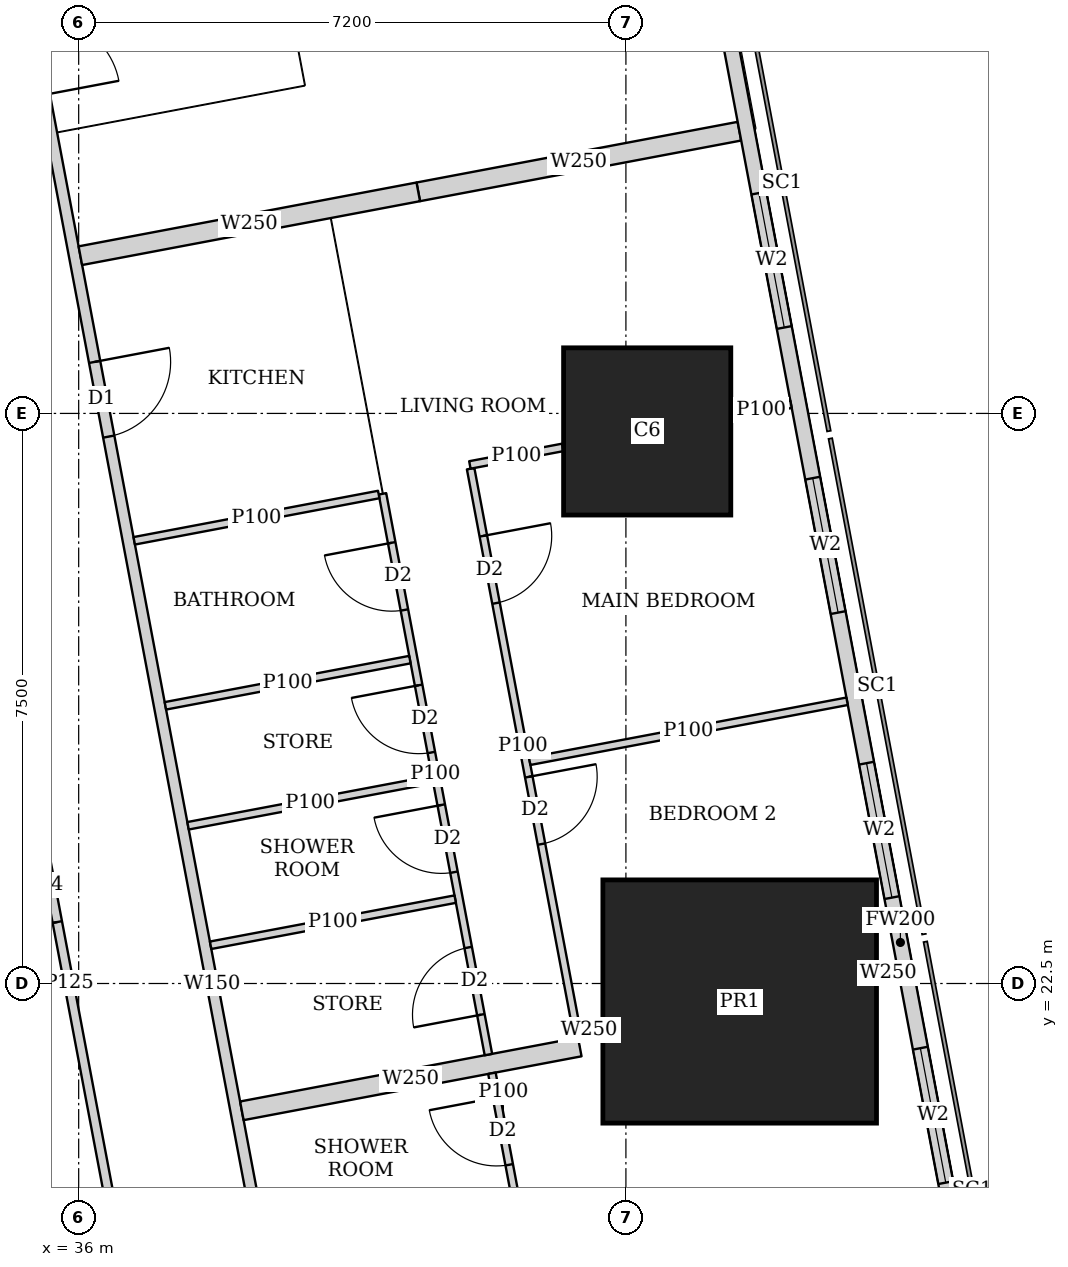
"""IFC4 building model, lengths in metres.
Left out: names, types, materials, properties, quantities, classifications, styles, units other than length and angle.
Written with IfcOpenShell. Run it as: python <this file> out.ifc"""

import sys

from ifc_helpers import new_model, si_unit, direction, frame, frame_2d, origin, origin_2d, place, context, subcontext, project, spatial, rectangle, extrude, element, fill, save


model = new_model("IFC4")
c1 = context("Model", 3, precision=1e-05, world=origin(), true_north=direction((0.0, 1.0)))
c2 = subcontext(c1, "Body", "Model", "MODEL_VIEW")
j1 = project(units=[si_unit("LENGTHUNIT", "METRE"), si_unit("PLANEANGLEUNIT", "RADIAN")], contexts=[c1])
p1 = place(None, origin())
s1 = spatial("IfcSite", under=j1, at=p1, CompositionType="ELEMENT")
p2 = place(p1, origin())
s2 = spatial("IfcBuilding", under=s1, at=p2, CompositionType="ELEMENT")
p3 = place(p2, frame((0.0, 0.0, 100.4)))
s3 = spatial("IfcBuildingStorey", under=s2, at=p3, CompositionType="ELEMENT", Elevation=100.4)
p4 = place(p3, frame((44.697, 22.263, 0.0), z_axis=(0.0, 0.0, 1.0), x_axis=(1.0, 0.0, 0.0)))
e1 = element("IfcColumn", 1, at=p4, inside=s3, PredefinedType="COLUMN", context=c2, shape_type="SweptSolid", body=[
    extrude(rectangle(XDim=3.6, YDim=3.2, at=origin_2d()), origin(), (0.0, 0.0, 1.0), 3.75),
])
p5 = place(p3, frame((43.48, 29.763, 0.0), z_axis=(0.0, 0.0, 1.0), x_axis=(1.0, 0.0, 0.0)))
e2 = element("IfcColumn", 2, at=p5, inside=s3, PredefinedType="COLUMN", context=c2, shape_type="SweptSolid", body=[
    extrude(rectangle(XDim=2.2, YDim=2.2, at=origin_2d()), origin(), (0.0, 0.0, 1.0), 3.75),
])
p6 = place(p3, frame((50.653, 2.703, 0.0), z_axis=(0.0, 0.0, 1.0), x_axis=(-0.185612026696, 0.982623109613, 0.0)))
e3 = element("IfcWall", 3, at=p6, inside=s3, PredefinedType="SOLIDWALL", context=c2, shape_type="SweptSolid", body=[
    extrude(rectangle(XDim=41.393, YDim=0.2, at=frame_2d((20.697, 0.0))), origin(), (0.0, 0.0, 1.0), 3.5),
])
p7 = place(p6, frame((1.633, 0.0, 0.9)))
e4 = element("IfcOpeningElement", 4, at=p7, cuts=e3, PredefinedType="OPENING", context=c2, shape_type="SweptSolid", body=[
    extrude(rectangle(XDim=1.8, YDim=1.5, at=frame_2d((0.9, 0.75))), frame((0.0, 0.11, 0.0), z_axis=(0.0, -1.0, 0.0), x_axis=(1.0, 0.0, 0.0)), (0.0, 0.0, 1.0), 0.22),
])
p8 = place(p6, frame((6.032, 0.0, 0.9)))
e5 = element("IfcOpeningElement", 5, at=p8, cuts=e3, PredefinedType="OPENING", context=c2, shape_type="SweptSolid", body=[
    extrude(rectangle(XDim=1.8, YDim=1.5, at=frame_2d((0.9, 0.75))), frame((0.0, 0.11, 0.0), z_axis=(0.0, -1.0, 0.0), x_axis=(1.0, 0.0, 0.0)), (0.0, 0.0, 1.0), 0.22),
])
p9 = place(p6, frame((9.848, 0.0, 0.9)))
e6 = element("IfcOpeningElement", 6, at=p9, cuts=e3, PredefinedType="OPENING", context=c2, shape_type="SweptSolid", body=[
    extrude(rectangle(XDim=1.8, YDim=1.5, at=frame_2d((0.9, 0.75))), frame((0.0, 0.11, 0.0), z_axis=(0.0, -1.0, 0.0), x_axis=(1.0, 0.0, 0.0)), (0.0, 0.0, 1.0), 0.22),
])
p10 = place(p6, frame((13.664, 0.0, 0.9)))
e7 = element("IfcOpeningElement", 7, at=p10, cuts=e3, PredefinedType="OPENING", context=c2, shape_type="SweptSolid", body=[
    extrude(rectangle(XDim=1.8, YDim=1.5, at=frame_2d((0.9, 0.75))), frame((0.0, 0.11, 0.0), z_axis=(0.0, -1.0, 0.0), x_axis=(1.0, 0.0, 0.0)), (0.0, 0.0, 1.0), 0.22),
])
p11 = place(p6, frame((17.481, 0.0, 0.9)))
e8 = element("IfcOpeningElement", 8, at=p11, cuts=e3, PredefinedType="OPENING", context=c2, shape_type="SweptSolid", body=[
    extrude(rectangle(XDim=1.8, YDim=1.5, at=frame_2d((0.9, 0.75))), frame((0.0, 0.11, 0.0), z_axis=(0.0, -1.0, 0.0), x_axis=(1.0, 0.0, 0.0)), (0.0, 0.0, 1.0), 0.22),
])
p12 = place(p6, frame((21.297, 0.0, 0.9)))
e9 = element("IfcOpeningElement", 9, at=p12, cuts=e3, PredefinedType="OPENING", context=c2, shape_type="SweptSolid", body=[
    extrude(rectangle(XDim=1.8, YDim=1.5, at=frame_2d((0.9, 0.75))), frame((0.0, 0.11, 0.0), z_axis=(0.0, -1.0, 0.0), x_axis=(1.0, 0.0, 0.0)), (0.0, 0.0, 1.0), 0.22),
])
p13 = place(p6, frame((25.113, 0.0, 0.9)))
e10 = element("IfcOpeningElement", 10, at=p13, cuts=e3, PredefinedType="OPENING", context=c2, shape_type="SweptSolid", body=[
    extrude(rectangle(XDim=1.8, YDim=1.5, at=frame_2d((0.9, 0.75))), frame((0.0, 0.11, 0.0), z_axis=(0.0, -1.0, 0.0), x_axis=(1.0, 0.0, 0.0)), (0.0, 0.0, 1.0), 0.22),
])
p14 = place(p6, frame((28.93, 0.0, 0.9)))
e11 = element("IfcOpeningElement", 11, at=p14, cuts=e3, PredefinedType="OPENING", context=c2, shape_type="SweptSolid", body=[
    extrude(rectangle(XDim=1.8, YDim=1.5, at=frame_2d((0.9, 0.75))), frame((0.0, 0.11, 0.0), z_axis=(0.0, -1.0, 0.0), x_axis=(1.0, 0.0, 0.0)), (0.0, 0.0, 1.0), 0.22),
])
p15 = place(p6, frame((32.746, 0.0, 0.9)))
e12 = element("IfcOpeningElement", 12, at=p15, cuts=e3, PredefinedType="OPENING", context=c2, shape_type="SweptSolid", body=[
    extrude(rectangle(XDim=1.8, YDim=1.5, at=frame_2d((0.9, 0.75))), frame((0.0, 0.11, 0.0), z_axis=(0.0, -1.0, 0.0), x_axis=(1.0, 0.0, 0.0)), (0.0, 0.0, 1.0), 0.22),
])
p16 = place(p6, frame((36.481, 0.0, 0.9)))
e13 = element("IfcOpeningElement", 13, at=p16, cuts=e3, PredefinedType="OPENING", context=c2, shape_type="SweptSolid", body=[
    extrude(rectangle(XDim=1.8, YDim=1.5, at=frame_2d((0.9, 0.75))), frame((0.0, 0.11, 0.0), z_axis=(0.0, -1.0, 0.0), x_axis=(1.0, 0.0, 0.0)), (0.0, 0.0, 1.0), 0.22),
])
p17 = place(p3, frame((33.382, 45.65, 0.0), z_axis=(0.0, 0.0, 1.0), x_axis=(0.185593544777, -0.982626600565, 0.0)))
e14 = element("IfcWall", 14, at=p17, inside=s3, PredefinedType="SOLIDWALL", context=c2, shape_type="SweptSolid", body=[
    extrude(rectangle(XDim=47.118, YDim=0.15, at=frame_2d((23.559, 0.0))), origin(), (0.0, 0.0, 1.0), 2.2),
])
p18 = place(p17, frame((10.662, 0.0, 0.0)))
e15 = element("IfcOpeningElement", 15, at=p18, cuts=e14, PredefinedType="OPENING", context=c2, shape_type="SweptSolid", body=[
    extrude(rectangle(XDim=1.0, YDim=2.1, at=frame_2d((0.5, 1.05))), frame((0.0, 0.085, 0.0), z_axis=(0.0, -1.0, 0.0), x_axis=(1.0, 0.0, 0.0)), (0.0, 0.0, 1.0), 0.17),
])
p19 = place(p17, frame((15.237, 0.0, 0.0)))
e16 = element("IfcOpeningElement", 16, at=p19, cuts=e14, PredefinedType="OPENING", context=c2, shape_type="SweptSolid", body=[
    extrude(rectangle(XDim=1.0, YDim=2.1, at=frame_2d((0.5, 1.05))), frame((0.0, 0.085, 0.0), z_axis=(0.0, -1.0, 0.0), x_axis=(1.0, 0.0, 0.0)), (0.0, 0.0, 1.0), 0.17),
])
p20 = place(p17, frame((27.341, 0.0, 0.0)))
e17 = element("IfcOpeningElement", 17, at=p20, cuts=e14, PredefinedType="OPENING", context=c2, shape_type="SweptSolid", body=[
    extrude(rectangle(XDim=1.0, YDim=2.1, at=frame_2d((0.5, 1.05))), frame((0.0, 0.085, 0.0), z_axis=(0.0, -1.0, 0.0), x_axis=(1.0, 0.0, 0.0)), (0.0, 0.0, 1.0), 0.17),
])
p21 = place(p17, frame((33.833, 0.0, 0.0)))
e18 = element("IfcOpeningElement", 18, at=p21, cuts=e14, PredefinedType="OPENING", context=c2, shape_type="SweptSolid", body=[
    extrude(rectangle(XDim=1.0, YDim=2.1, at=frame_2d((0.5, 1.05))), frame((0.0, 0.085, 0.0), z_axis=(0.0, -1.0, 0.0), x_axis=(1.0, 0.0, 0.0)), (0.0, 0.0, 1.0), 0.17),
])
p22 = place(p3, frame((41.157, 29.273, 0.0), z_axis=(0.0, 0.0, 1.0), x_axis=(0.18542464283, -0.982658486877, 0.0)))
e19 = element("IfcWall", 19, at=p22, inside=s3, PredefinedType="PARTITIONING", context=c2, shape_type="SweptSolid", body=[
    extrude(rectangle(XDim=7.421, YDim=0.1, at=frame_2d((3.71, 0.0))), origin(), (0.0, 0.0, 1.0), 2.5),
])
p23 = place(p22, frame((0.9, 0.0, 0.0)))
e20 = element("IfcOpeningElement", 20, at=p23, cuts=e19, PredefinedType="OPENING", context=c2, shape_type="SweptSolid", body=[
    extrude(rectangle(XDim=0.9, YDim=2.1, at=frame_2d((0.45, 1.05))), frame((0.0, 0.06, 0.0), z_axis=(0.0, -1.0, 0.0), x_axis=(1.0, 0.0, 0.0)), (0.0, 0.0, 1.0), 0.12),
])
p24 = place(p22, frame((4.126, 0.0, 0.0)))
e21 = element("IfcOpeningElement", 21, at=p24, cuts=e19, PredefinedType="OPENING", context=c2, shape_type="SweptSolid", body=[
    extrude(rectangle(XDim=0.9, YDim=2.1, at=frame_2d((0.45, 1.05))), frame((0.0, 0.06, 0.0), z_axis=(0.0, -1.0, 0.0), x_axis=(1.0, 0.0, 0.0)), (0.0, 0.0, 1.0), 0.12),
])
p25 = place(p3, frame((39.997, 28.942, 0.0), z_axis=(0.0, 0.0, 1.0), x_axis=(0.185686318797, -0.982609073341, 0.0)))
e22 = element("IfcWall", 22, at=p25, inside=s3, PredefinedType="PARTITIONING", context=c2, shape_type="SweptSolid", body=[
    extrude(rectangle(XDim=7.508, YDim=0.1, at=frame_2d((3.754, 0.0))), origin(), (0.0, 0.0, 1.0), 2.5),
])
p26 = place(p25, frame((0.655, 0.0, 0.0)))
e23 = element("IfcOpeningElement", 23, at=p26, cuts=e22, PredefinedType="OPENING", context=c2, shape_type="SweptSolid", body=[
    extrude(rectangle(XDim=0.9, YDim=2.1, at=frame_2d((0.45, 1.05))), frame((0.0, 0.06, 0.0), z_axis=(0.0, -1.0, 0.0), x_axis=(1.0, 0.0, 0.0)), (0.0, 0.0, 1.0), 0.12),
])
p27 = place(p25, frame((4.166, 0.0, 0.0)))
e24 = element("IfcOpeningElement", 24, at=p27, cuts=e22, PredefinedType="OPENING", context=c2, shape_type="SweptSolid", body=[
    extrude(rectangle(XDim=0.9, YDim=2.1, at=frame_2d((0.45, 1.05))), frame((0.0, 0.06, 0.0), z_axis=(0.0, -1.0, 0.0), x_axis=(1.0, 0.0, 0.0)), (0.0, 0.0, 1.0), 0.12),
])
p28 = place(p25, frame((2.563, 0.0, 0.0)))
e25 = element("IfcOpeningElement", 25, at=p28, cuts=e22, PredefinedType="OPENING", context=c2, shape_type="SweptSolid", body=[
    extrude(rectangle(XDim=0.9, YDim=2.1, at=frame_2d((0.45, 1.05))), frame((0.0, 0.06, 0.0), z_axis=(0.0, -1.0, 0.0), x_axis=(1.0, 0.0, 0.0)), (0.0, 0.0, 1.0), 0.12),
])
p29 = place(p25, frame((6.074, 0.0, 0.0)))
e26 = element("IfcOpeningElement", 26, at=p29, cuts=e22, PredefinedType="OPENING", context=c2, shape_type="SweptSolid", body=[
    extrude(rectangle(XDim=0.9, YDim=2.1, at=frame_2d((0.45, 1.05))), frame((0.0, 0.06, 0.0), z_axis=(0.0, -1.0, 0.0), x_axis=(1.0, 0.0, 0.0)), (0.0, 0.0, 1.0), 0.12),
])
p30 = place(p3, frame((45.372, 30.121, 0.0), z_axis=(0.0, 0.0, 1.0), x_axis=(-0.982512656401, -0.186195810938, 0.0)))
e27 = element("IfcWall", 27, at=p30, inside=s3, PredefinedType="PARTITIONING", context=c2, shape_type="SweptSolid", body=[
    extrude(rectangle(XDim=0.796, YDim=0.1, at=frame_2d((0.398, 0.0))), origin(), (0.0, 0.0, 1.0), 3.5),
])
p31 = place(p3, frame((42.37, 29.553, 0.0), z_axis=(0.0, 0.0, 1.0), x_axis=(-0.98263602344, -0.185543648338, 0.0)))
e28 = element("IfcWall", 28, at=p31, inside=s3, PredefinedType="PARTITIONING", context=c2, shape_type="SweptSolid", body=[
    extrude(rectangle(XDim=1.245, YDim=0.1, at=frame_2d((0.623, 0.0))), origin(), (0.0, 0.0, 1.0), 2.5),
])
p32 = place(p3, frame((46.11, 26.213, 0.0), z_axis=(0.0, 0.0, 1.0), x_axis=(-0.982623519589, -0.185609856287, 0.0)))
e29 = element("IfcWall", 29, at=p32, inside=s3, PredefinedType="PARTITIONING", context=c2, shape_type="SweptSolid", body=[
    extrude(rectangle(XDim=4.25, YDim=0.1, at=frame_2d((2.125, 0.0))), origin(), (0.0, 0.0, 1.0), 2.2),
])
p33 = place(p3, frame((39.948, 28.933, 0.0), z_axis=(0.0, 0.0, 1.0), x_axis=(-0.982542259571, -0.186039533857, 0.0)))
e30 = element("IfcWall", 30, at=p33, inside=s3, PredefinedType="PARTITIONING", context=c2, shape_type="SweptSolid", body=[
    extrude(rectangle(XDim=3.274, YDim=0.1, at=frame_2d((1.637, 0.0))), origin(), (0.0, 0.0, 1.0), 3.5),
])
p34 = place(p3, frame((40.656, 25.183, 0.0), z_axis=(0.0, 0.0, 1.0), x_axis=(-0.982596739811, -0.18575157311, 0.0)))
e31 = element("IfcWall", 31, at=p34, inside=s3, PredefinedType="PARTITIONING", context=c2, shape_type="SweptSolid", body=[
    extrude(rectangle(XDim=3.274, YDim=0.1, at=frame_2d((1.637, 0.0))), origin(), (0.0, 0.0, 1.0), 3.5),
])
p35 = place(p3, frame((40.358, 26.761, 0.0), z_axis=(0.0, 0.0, 1.0), x_axis=(-0.982607776398, -0.185693181787, 0.0)))
e32 = element("IfcWall", 32, at=p35, inside=s3, PredefinedType="PARTITIONING", context=c2, shape_type="SweptSolid", body=[
    extrude(rectangle(XDim=3.274, YDim=0.1, at=frame_2d((1.637, 0.0))), origin(), (0.0, 0.0, 1.0), 3.5),
])
p36 = place(p3, frame((40.954, 23.61, 0.0), z_axis=(0.0, 0.0, 1.0), x_axis=(-0.982661397469, -0.185409217473, 0.0)))
e33 = element("IfcWall", 33, at=p36, inside=s3, PredefinedType="PARTITIONING", context=c2, shape_type="SweptSolid", body=[
    extrude(rectangle(XDim=3.275, YDim=0.1, at=frame_2d((1.637, 0.0))), origin(), (0.0, 0.0, 1.0), 2.5),
])
p37 = place(p3, frame((44.693, 33.713, 0.0), z_axis=(0.0, 0.0, 1.0), x_axis=(-0.982633535512, -0.185556823879, 0.0)))
e34 = element("IfcWall", 34, at=p37, inside=s3, PredefinedType="SOLIDWALL", context=c2, shape_type="SweptSolid", body=[
    extrude(rectangle(XDim=4.3, YDim=0.25, at=frame_2d((2.15, 0.0))), origin(), (0.0, 0.0, 1.0), 2.2),
])
p38 = place(p3, frame((40.468, 32.915, 0.0), z_axis=(0.0, 0.0, 1.0), x_axis=(-0.982612837616, -0.185666398014, 0.0)))
e35 = element("IfcWall", 35, at=p38, inside=s3, PredefinedType="SOLIDWALL", context=c2, shape_type="SweptSolid", body=[
    extrude(rectangle(XDim=4.525, YDim=0.25, at=frame_2d((2.262, 0.0))), origin(), (0.0, 0.0, 1.0), 3.5),
])
p39 = place(p3, frame((41.437, 21.319, 0.0), z_axis=(0.0, 0.0, 1.0), x_axis=(0.185793689589, -0.982588777113, 0.0)))
e36 = element("IfcWall", 36, at=p39, inside=s3, PredefinedType="PARTITIONING", context=c2, shape_type="SweptSolid", body=[
    extrude(rectangle(XDim=1.625, YDim=0.1, at=frame_2d((0.813, 0.0))), origin(), (0.0, 0.0, 1.0), 3.5),
])
p40 = place(p39, frame((0.325, 0.0, 0.0)))
e37 = element("IfcOpeningElement", 37, at=p40, cuts=e36, PredefinedType="OPENING", context=c2, shape_type="SweptSolid", body=[
    extrude(rectangle(XDim=0.9, YDim=2.1, at=frame_2d((0.45, 1.05))), frame((0.0, 0.06, 0.0), z_axis=(0.0, -1.0, 0.0), x_axis=(1.0, 0.0, 0.0)), (0.0, 0.0, 1.0), 0.12),
])
p41 = place(p3, frame((46.782, 22.657, 0.0), z_axis=(0.0, 0.0, 1.0), x_axis=(-0.982104607121, -0.188336243648, 0.0)))
e38 = element("IfcWall", 38, at=p41, inside=s3, PredefinedType="SOLIDWALL", context=c2, shape_type="SweptSolid", body=[
    extrude(rectangle(XDim=0.266, YDim=0.25, at=frame_2d((0.133, 0.0))), origin(), (0.0, 0.0, 1.0), 3.5),
])
p42 = place(p3, frame((42.873, 21.918, 0.0), z_axis=(0.0, 0.0, 1.0), x_axis=(-0.982431406936, -0.186624035603, 0.0)))
e39 = element("IfcWall", 39, at=p42, inside=s3, PredefinedType="SOLIDWALL", context=c2, shape_type="SweptSolid", body=[
    extrude(rectangle(XDim=0.322, YDim=0.25, at=frame_2d((0.161, 0.0))), origin(), (0.0, 0.0, 1.0), 2.5),
])
p43 = place(p3, frame((42.593, 21.665, 0.0), z_axis=(0.0, 0.0, 1.0), x_axis=(-0.982612837616, -0.185666398014, 0.0)))
e40 = element("IfcWall", 40, at=p43, inside=s3, PredefinedType="SOLIDWALL", context=c2, shape_type="SweptSolid", body=[
    extrude(rectangle(XDim=4.525, YDim=0.25, at=frame_2d((2.262, 0.0))), origin(), (0.0, 0.0, 1.0), 2.5),
])
p44 = place(p3, frame((38.202, 10.163, 0.0), z_axis=(0.0, 0.0, 1.0), x_axis=(-0.185610321132, 0.982623431783, 0.0)))
e41 = element("IfcWall", 41, at=p44, inside=s3, PredefinedType="PARTITIONING", context=c2, shape_type="SweptSolid", body=[
    extrude(rectangle(XDim=25.111, YDim=0.125, at=frame_2d((12.556, 0.0))), origin(), (0.0, 0.0, 1.0), 2.5),
])
p45 = place(p44, frame((0.708, 0.0, 0.0)))
e42 = element("IfcOpeningElement", 42, at=p45, cuts=e41, PredefinedType="OPENING", context=c2, shape_type="SweptSolid", body=[
    extrude(rectangle(XDim=1.0, YDim=2.1, at=frame_2d((0.5, 1.05))), frame((0.0, 0.073, 0.0), z_axis=(0.0, -1.0, 0.0), x_axis=(1.0, 0.0, 0.0)), (0.0, 0.0, 1.0), 0.145),
])
p46 = place(p44, frame((6.0, 0.0, 0.0)))
e43 = element("IfcOpeningElement", 43, at=p46, cuts=e41, PredefinedType="OPENING", context=c2, shape_type="SweptSolid", body=[
    extrude(rectangle(XDim=1.0, YDim=2.1, at=frame_2d((0.5, 1.05))), frame((0.0, 0.073, 0.0), z_axis=(0.0, -1.0, 0.0), x_axis=(1.0, 0.0, 0.0)), (0.0, 0.0, 1.0), 0.145),
])
p47 = place(p44, frame((13.378, 0.0, 0.0)))
e44 = element("IfcOpeningElement", 44, at=p47, cuts=e41, PredefinedType="OPENING", context=c2, shape_type="SweptSolid", body=[
    extrude(rectangle(XDim=1.0, YDim=2.1, at=frame_2d((0.5, 1.05))), frame((0.0, 0.073, 0.0), z_axis=(0.0, -1.0, 0.0), x_axis=(1.0, 0.0, 0.0)), (0.0, 0.0, 1.0), 0.145),
])
p48 = place(p44, frame((21.25, 0.0, 0.0)))
e45 = element("IfcOpeningElement", 45, at=p48, cuts=e41, PredefinedType="OPENING", context=c2, shape_type="SweptSolid", body=[
    extrude(rectangle(XDim=1.0, YDim=2.1, at=frame_2d((0.5, 1.05))), frame((0.0, 0.073, 0.0), z_axis=(0.0, -1.0, 0.0), x_axis=(1.0, 0.0, 0.0)), (0.0, 0.0, 1.0), 0.145),
])
p49 = place(p3, frame((33.801, 22.5, 0.0), z_axis=(0.0, 0.0, 1.0), x_axis=(1.0, 0.0, 0.0)))
e46 = element("IfcWall", 46, at=p49, inside=s3, PredefinedType="PARTITIONING", context=c2, shape_type="SweptSolid", body=[
    extrude(rectangle(XDim=1.995, YDim=0.125, at=frame_2d((0.998, 0.0))), origin(), (0.0, 0.0, 1.0), 2.5),
])
p50 = place(p11, origin())
e47 = element("IfcWindow", 47, at=p50, inside=s3, PartitioningType="SINGLE_PANEL", PredefinedType="WINDOW", context=c2, shape_type="SweptSolid", body=[
    extrude(rectangle(XDim=1.8, YDim=1.5, at=frame_2d((0.9, 0.75))), frame((0.0, 0.03, 0.0), z_axis=(0.0, -1.0, 0.0), x_axis=(1.0, 0.0, 0.0)), (0.0, 0.0, 1.0), 0.06),
])
fill(e8, e47)
p51 = place(p12, origin())
e48 = element("IfcWindow", 48, at=p51, inside=s3, PartitioningType="SINGLE_PANEL", PredefinedType="WINDOW", context=c2, shape_type="SweptSolid", body=[
    extrude(rectangle(XDim=1.8, YDim=1.5, at=frame_2d((0.9, 0.75))), frame((0.0, 0.03, 0.0), z_axis=(0.0, -1.0, 0.0), x_axis=(1.0, 0.0, 0.0)), (0.0, 0.0, 1.0), 0.06),
])
fill(e9, e48)
p52 = place(p13, origin())
e49 = element("IfcWindow", 49, at=p52, inside=s3, PartitioningType="SINGLE_PANEL", PredefinedType="WINDOW", context=c2, shape_type="SweptSolid", body=[
    extrude(rectangle(XDim=1.8, YDim=1.5, at=frame_2d((0.9, 0.75))), frame((0.0, 0.03, 0.0), z_axis=(0.0, -1.0, 0.0), x_axis=(1.0, 0.0, 0.0)), (0.0, 0.0, 1.0), 0.06),
])
fill(e10, e49)
p53 = place(p14, origin())
e50 = element("IfcWindow", 50, at=p53, inside=s3, PartitioningType="SINGLE_PANEL", PredefinedType="WINDOW", context=c2, shape_type="SweptSolid", body=[
    extrude(rectangle(XDim=1.8, YDim=1.5, at=frame_2d((0.9, 0.75))), frame((0.0, 0.03, 0.0), z_axis=(0.0, -1.0, 0.0), x_axis=(1.0, 0.0, 0.0)), (0.0, 0.0, 1.0), 0.06),
])
fill(e11, e50)
p54 = place(p23, origin())
e51 = element("IfcDoor", 51, at=p54, inside=s3, OperationType="SINGLE_SWING_LEFT", PredefinedType="DOOR", context=c2, shape_type="SweptSolid", body=[
    extrude(rectangle(XDim=0.9, YDim=2.1, at=frame_2d((0.45, 1.05))), frame((0.0, 0.025, 0.0), z_axis=(0.0, -1.0, 0.0), x_axis=(1.0, 0.0, 0.0)), (0.0, 0.0, 1.0), 0.05),
])
fill(e20, e51)
p55 = place(p24, origin())
e52 = element("IfcDoor", 52, at=p55, inside=s3, OperationType="SINGLE_SWING_LEFT", PredefinedType="DOOR", context=c2, shape_type="SweptSolid", body=[
    extrude(rectangle(XDim=0.9, YDim=2.1, at=frame_2d((0.45, 1.05))), frame((0.0, 0.025, 0.0), z_axis=(0.0, -1.0, 0.0), x_axis=(1.0, 0.0, 0.0)), (0.0, 0.0, 1.0), 0.05),
])
fill(e21, e52)
p56 = place(p26, origin())
e53 = element("IfcDoor", 53, at=p56, inside=s3, OperationType="SINGLE_SWING_RIGHT", PredefinedType="DOOR", context=c2, shape_type="SweptSolid", body=[
    extrude(rectangle(XDim=0.9, YDim=2.1, at=frame_2d((0.45, 1.05))), frame((0.0, 0.025, 0.0), z_axis=(0.0, -1.0, 0.0), x_axis=(1.0, 0.0, 0.0)), (0.0, 0.0, 1.0), 0.05),
])
fill(e23, e53)
p57 = place(p27, origin())
e54 = element("IfcDoor", 54, at=p57, inside=s3, OperationType="SINGLE_SWING_RIGHT", PredefinedType="DOOR", context=c2, shape_type="SweptSolid", body=[
    extrude(rectangle(XDim=0.9, YDim=2.1, at=frame_2d((0.45, 1.05))), frame((0.0, 0.025, 0.0), z_axis=(0.0, -1.0, 0.0), x_axis=(1.0, 0.0, 0.0)), (0.0, 0.0, 1.0), 0.05),
])
fill(e24, e54)
p58 = place(p28, origin())
e55 = element("IfcDoor", 55, at=p58, inside=s3, OperationType="SINGLE_SWING_RIGHT", PredefinedType="DOOR", context=c2, shape_type="SweptSolid", body=[
    extrude(rectangle(XDim=0.9, YDim=2.1, at=frame_2d((0.45, 1.05))), frame((0.0, 0.025, 0.0), z_axis=(0.0, -1.0, 0.0), x_axis=(1.0, 0.0, 0.0)), (0.0, 0.0, 1.0), 0.05),
])
fill(e25, e55)
p59 = place(p29, origin())
e56 = element("IfcDoor", 56, at=p59, inside=s3, OperationType="SINGLE_SWING_LEFT", PredefinedType="DOOR", context=c2, shape_type="SweptSolid", body=[
    extrude(rectangle(XDim=0.9, YDim=2.1, at=frame_2d((0.45, 1.05))), frame((0.0, 0.025, 0.0), z_axis=(0.0, -1.0, 0.0), x_axis=(1.0, 0.0, 0.0)), (0.0, 0.0, 1.0), 0.05),
])
fill(e26, e56)
p60 = place(p19, origin())
e57 = element("IfcDoor", 57, at=p60, inside=s3, OperationType="SINGLE_SWING_LEFT", PredefinedType="DOOR", context=c2, shape_type="SweptSolid", body=[
    extrude(rectangle(XDim=1.0, YDim=2.1, at=frame_2d((0.5, 1.05))), frame((0.0, 0.025, 0.0), z_axis=(0.0, -1.0, 0.0), x_axis=(1.0, 0.0, 0.0)), (0.0, 0.0, 1.0), 0.05),
])
fill(e16, e57)
p61 = place(p40, origin())
e58 = element("IfcDoor", 58, at=p61, inside=s3, OperationType="SINGLE_SWING_RIGHT", PredefinedType="DOOR", context=c2, shape_type="SweptSolid", body=[
    extrude(rectangle(XDim=0.9, YDim=2.1, at=frame_2d((0.45, 1.05))), frame((0.0, 0.025, 0.0), z_axis=(0.0, -1.0, 0.0), x_axis=(1.0, 0.0, 0.0)), (0.0, 0.0, 1.0), 0.05),
])
fill(e37, e58)
p62 = place(p47, origin())
e59 = element("IfcDoor", 59, at=p62, inside=s3, OperationType="SINGLE_SWING_LEFT", PredefinedType="DOOR", context=c2, shape_type="SweptSolid", body=[
    extrude(rectangle(XDim=1.0, YDim=2.1, at=frame_2d((0.5, 1.05))), frame((0.0, 0.025, 0.0), z_axis=(0.0, -1.0, 0.0), x_axis=(1.0, 0.0, 0.0)), (0.0, 0.0, 1.0), 0.05),
])
fill(e44, e59)
save(model, sys.argv[1])
